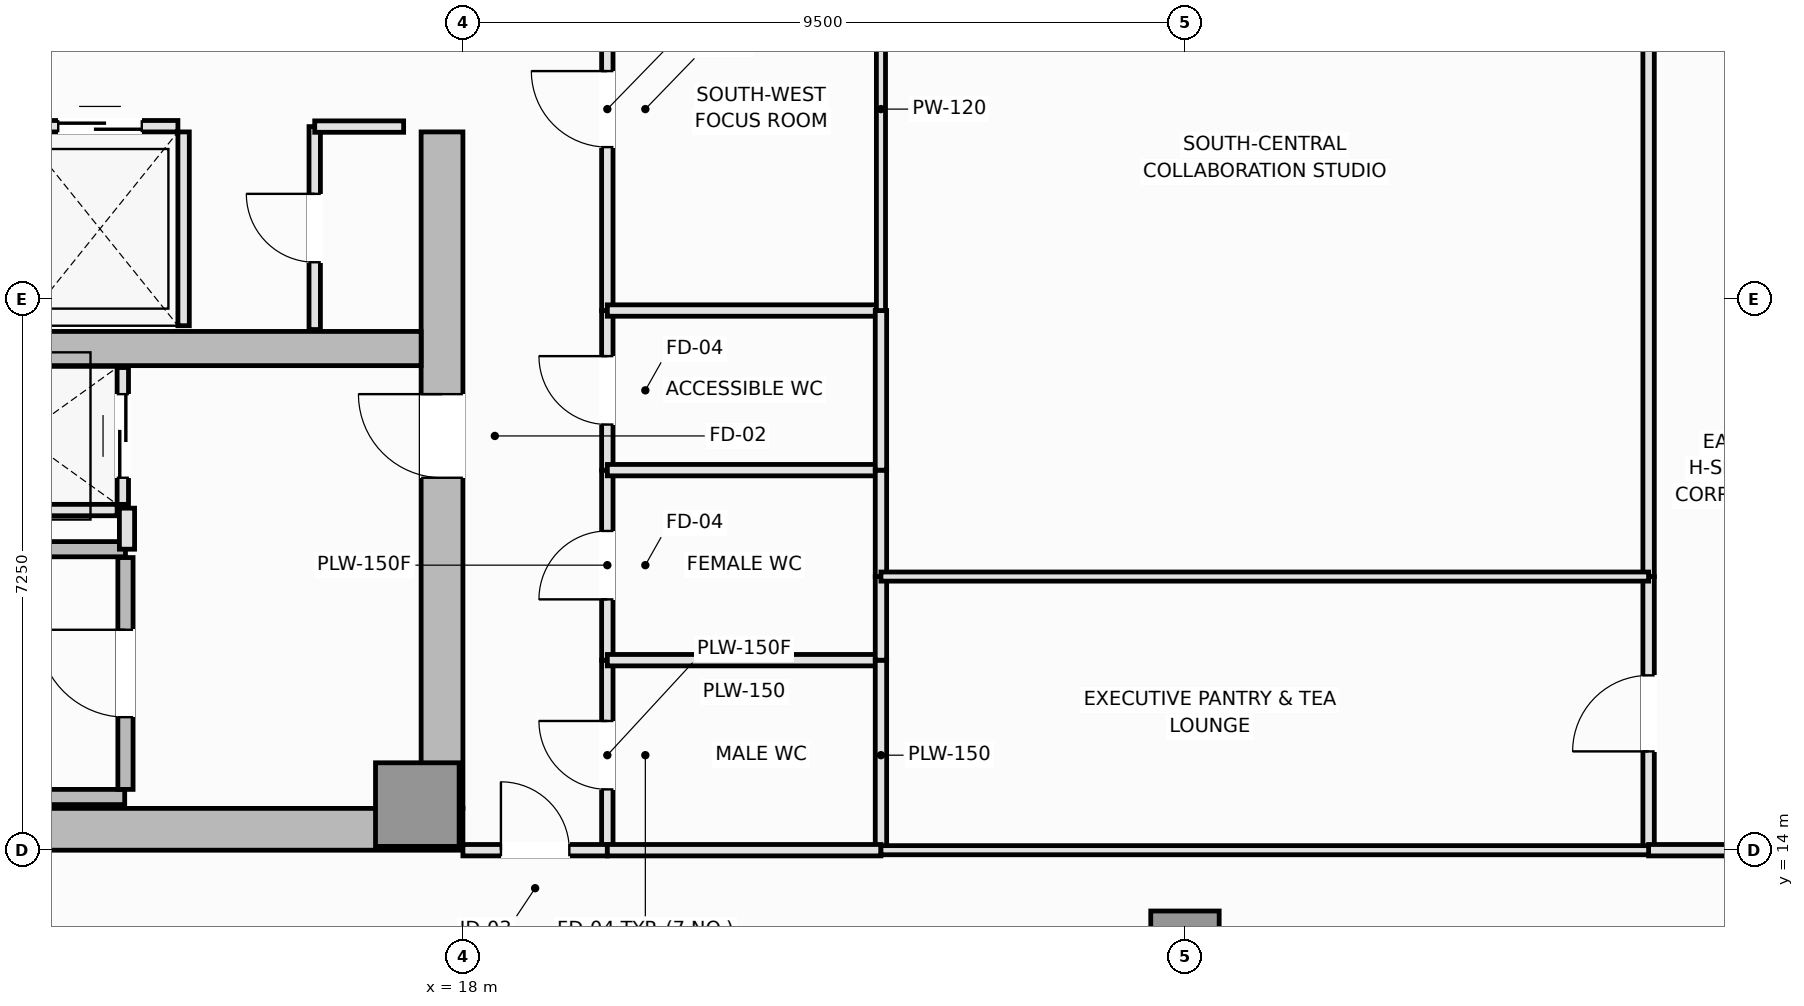
"""IFC4 building model, lengths in metres.
Left out: names, types, materials, properties, quantities, classifications, styles, units other than length and angle.
Written with IfcOpenShell. Run it as: python <this file> out.ifc"""

import sys

from ifc_helpers import new_model, si_unit, direction, frame, frame_2d, origin, origin_2d, place, context, subcontext, project, spatial, rectangle, extrude, element, fill, save


model = new_model("IFC4")
c1 = context("Model", 3, precision=1e-05, world=origin(), true_north=direction((0.0, 1.0)))
c2 = subcontext(c1, "Body", "Model", "MODEL_VIEW")
j1 = project(units=[si_unit("LENGTHUNIT", "METRE"), si_unit("PLANEANGLEUNIT", "RADIAN")], contexts=[c1])
p1 = place(None, origin())
s1 = spatial("IfcSite", under=j1, at=p1, CompositionType="ELEMENT")
p2 = place(p1, origin())
s2 = spatial("IfcBuilding", under=s1, at=p2, CompositionType="ELEMENT")
p3 = place(p2, frame((0.0, 0.0, 234.2)))
s3 = spatial("IfcBuildingStorey", under=s2, at=p3, CompositionType="ELEMENT", Elevation=234.2)
p4 = place(p3, frame((4.5, 14.275, 0.0), z_axis=(0.0, 0.0, 1.0), x_axis=(1.0, 0.0, 0.0)))
e1 = element("IfcWall", 1, at=p4, inside=s3, PredefinedType="SHEAR", context=c2, shape_type="SweptSolid", body=[
    extrude(rectangle(XDim=13.5, YDim=0.55, at=frame_2d((6.75, 0.0))), origin(), (0.0, 0.0, 1.0), 3.55),
])
p5 = place(p3, frame((17.725, 14.55, 0.0), z_axis=(0.0, 0.0, 1.0), x_axis=(0.0, 1.0, 0.0)))
e2 = element("IfcWall", 2, at=p5, inside=s3, PredefinedType="SHEAR", context=c2, shape_type="SweptSolid", body=[
    extrude(rectangle(XDim=8.9, YDim=0.55, at=frame_2d((4.45, 0.0))), origin(), (0.0, 0.0, 1.0), 3.55),
])
p6 = place(p5, frame((4.35, 0.0, 0.0)))
e3 = element("IfcOpeningElement", 3, at=p6, cuts=e2, PredefinedType="OPENING", context=c2, shape_type="SweptSolid", body=[
    extrude(rectangle(XDim=1.1, YDim=2.15, at=frame_2d((0.55, 1.075))), frame((0.0, 0.285, 0.0), z_axis=(0.0, -1.0, 0.0), x_axis=(1.0, 0.0, 0.0)), (0.0, 0.0, 1.0), 0.57),
])
p7 = place(p3, frame((5.05, 20.6, 0.0), z_axis=(0.0, 0.0, 1.0), x_axis=(1.0, 0.0, 0.0)))
e4 = element("IfcWall", 4, at=p7, inside=s3, PredefinedType="SHEAR", context=c2, shape_type="SweptSolid", body=[
    extrude(rectangle(XDim=12.4, YDim=0.45, at=frame_2d((6.2, 0.0))), origin(), (0.0, 0.0, 1.0), 3.55),
])
p8 = place(p3, frame((17.4, 14.6, 0.0), z_axis=(0.0, 0.0, 1.0), x_axis=(1.0, 0.0, 0.0)))
e5 = element("IfcColumn", 5, at=p8, inside=s3, PredefinedType="PILASTER", context=c2, shape_type="SweptSolid", body=[
    extrude(rectangle(XDim=1.1, YDim=1.1, at=origin_2d()), origin(), (0.0, 0.0, 1.0), 3.55),
])
p9 = place(p3, frame((27.5, 12.75, 0.0), z_axis=(0.0, 0.0, 1.0), x_axis=(1.0, 0.0, 0.0)))
e6 = element("IfcColumn", 6, at=p9, inside=s3, PredefinedType="COLUMN", context=c2, shape_type="SweptSolid", body=[
    extrude(rectangle(XDim=0.9, YDim=0.9, at=origin_2d()), origin(), (0.0, 0.0, 1.0), 3.55),
])
p10 = place(p3, frame((5.8, 14.7, 0.0), z_axis=(0.0, 0.0, 1.0), x_axis=(1.0, 0.0, 0.0)))
e7 = element("IfcWall", 7, at=p10, inside=s3, PredefinedType="SOLIDWALL", context=c2, shape_type="SweptSolid", body=[
    extrude(rectangle(XDim=7.75, YDim=0.2, at=frame_2d((3.875, 0.0))), origin(), (0.0, 0.0, 1.0), 3.55),
])
p11 = place(p3, frame((5.9, 17.96, 0.0), z_axis=(0.0, 0.0, 1.0), x_axis=(1.0, 0.0, 0.0)))
e8 = element("IfcWall", 8, at=p11, inside=s3, PredefinedType="SOLIDWALL", context=c2, shape_type="SweptSolid", body=[
    extrude(rectangle(XDim=7.66, YDim=0.2, at=frame_2d((3.83, 0.0))), origin(), (0.0, 0.0, 1.0), 3.55),
])
p12 = place(p3, frame((13.56, 14.8, 0.0), z_axis=(0.0, 0.0, 1.0), x_axis=(0.0, 1.0, 0.0)))
e9 = element("IfcWall", 9, at=p12, inside=s3, PredefinedType="SOLIDWALL", context=c2, shape_type="SweptSolid", body=[
    extrude(rectangle(XDim=3.05, YDim=0.2, at=frame_2d((1.525, 0.0))), origin(), (0.0, 0.0, 1.0), 3.55),
])
p13 = place(p12, frame((0.95, 0.0, 0.0)))
e10 = element("IfcOpeningElement", 10, at=p13, cuts=e9, PredefinedType="OPENING", context=c2, shape_type="SweptSolid", body=[
    extrude(rectangle(XDim=1.15, YDim=2.15, at=frame_2d((0.575, 1.075))), frame((0.0, 0.11, 0.0), z_axis=(0.0, -1.0, 0.0), x_axis=(1.0, 0.0, 0.0)), (0.0, 0.0, 1.0), 0.22),
])
p14 = place(p3, frame((12.2, 23.525, 0.0), z_axis=(0.0, 0.0, 1.0), x_axis=(1.0, 0.0, 0.0)))
e11 = element("IfcWall", 11, at=p14, inside=s3, PredefinedType="PARTITIONING", context=c2, shape_type="SweptSolid", body=[
    extrude(rectangle(XDim=2.05, YDim=0.15, at=frame_2d((1.025, 0.0))), origin(), (0.0, 0.0, 1.0), 3.37),
])
p15 = place(p14, frame((0.475, 0.0, 0.0)))
e12 = element("IfcOpeningElement", 12, at=p15, cuts=e11, PredefinedType="OPENING", context=c2, shape_type="SweptSolid", body=[
    extrude(rectangle(XDim=1.1, YDim=2.2, at=frame_2d((0.55, 1.1))), frame((0.0, 0.085, 0.0), z_axis=(0.0, -1.0, 0.0), x_axis=(1.0, 0.0, 0.0)), (0.0, 0.0, 1.0), 0.17),
])
p16 = place(p3, frame((14.325, 20.9, 0.0), z_axis=(0.0, 0.0, 1.0), x_axis=(0.0, 1.0, 0.0)))
e13 = element("IfcWall", 13, at=p16, inside=s3, PredefinedType="PARTITIONING", context=c2, shape_type="SweptSolid", body=[
    extrude(rectangle(XDim=2.55, YDim=0.15, at=frame_2d((1.275, 0.0))), origin(), (0.0, 0.0, 1.0), 3.37),
])
p17 = place(p3, frame((10.95, 18.475, 0.0), z_axis=(0.0, 0.0, 1.0), x_axis=(1.0, 0.0, 0.0)))
e14 = element("IfcWall", 14, at=p17, inside=s3, PredefinedType="PARTITIONING", context=c2, shape_type="SweptSolid", body=[
    extrude(rectangle(XDim=2.5, YDim=0.15, at=frame_2d((1.25, 0.0))), origin(), (0.0, 0.0, 1.0), 3.37),
])
p18 = place(p3, frame((13.525, 18.55, 0.0), z_axis=(0.0, 0.0, 1.0), x_axis=(0.0, 1.0, 0.0)))
e15 = element("IfcWall", 15, at=p18, inside=s3, PredefinedType="PARTITIONING", context=c2, shape_type="SweptSolid", body=[
    extrude(rectangle(XDim=1.8, YDim=0.15, at=frame_2d((0.9, 0.0))), origin(), (0.0, 0.0, 1.0), 3.37),
])
p19 = place(p18, frame((0.35, 0.0, 0.0)))
e16 = element("IfcOpeningElement", 16, at=p19, cuts=e15, PredefinedType="OPENING", context=c2, shape_type="SweptSolid", body=[
    extrude(rectangle(XDim=1.1, YDim=2.2, at=frame_2d((0.55, 1.1))), frame((0.0, 0.085, 0.0), z_axis=(0.0, -1.0, 0.0), x_axis=(1.0, 0.0, 0.0)), (0.0, 0.0, 1.0), 0.17),
])
p20 = place(p3, frame((13.58, 17.96, 0.0), z_axis=(0.0, 0.0, 1.0), x_axis=(0.0, 1.0, 0.0)))
e17 = element("IfcWall", 17, at=p20, inside=s3, PredefinedType="PARTITIONING", context=c2, shape_type="SweptSolid", body=[
    extrude(rectangle(XDim=0.54, YDim=0.2, at=frame_2d((0.27, 0.0))), origin(), (0.0, 0.0, 1.0), 3.37),
])
p21 = place(p3, frame((16.05, 20.85, 0.0), z_axis=(0.0, 0.0, 1.0), x_axis=(0.0, 1.0, 0.0)))
e18 = element("IfcWall", 18, at=p21, inside=s3, PredefinedType="PARTITIONING", context=c2, shape_type="SweptSolid", body=[
    extrude(rectangle(XDim=2.67, YDim=0.15, at=frame_2d((1.335, 0.0))), origin(), (0.0, 0.0, 1.0), 3.37),
])
p22 = place(p21, frame((0.885, 0.0, 0.0)))
e19 = element("IfcOpeningElement", 19, at=p22, cuts=e18, PredefinedType="OPENING", context=c2, shape_type="SweptSolid", body=[
    extrude(rectangle(XDim=0.9, YDim=2.1, at=frame_2d((0.45, 1.05))), frame((0.0, 0.085, 0.0), z_axis=(0.0, -1.0, 0.0), x_axis=(1.0, 0.0, 0.0)), (0.0, 0.0, 1.0), 0.17),
])
p23 = place(p3, frame((16.05, 23.52, 0.0), z_axis=(0.0, 0.0, 1.0), x_axis=(1.0, 0.0, 0.0)))
e20 = element("IfcWall", 20, at=p23, inside=s3, PredefinedType="PARTITIONING", context=c2, shape_type="SweptSolid", body=[
    extrude(rectangle(XDim=1.17, YDim=0.15, at=frame_2d((0.585, 0.0))), origin(), (0.0, 0.0, 1.0), 3.37),
])
p24 = place(p3, frame((19.9, 14.0, 0.0), z_axis=(0.0, 0.0, 1.0), x_axis=(0.0, 1.0, 0.0)))
e21 = element("IfcWall", 21, at=p24, inside=s3, PredefinedType="PLUMBINGWALL", context=c2, shape_type="SweptSolid", body=[
    extrude(rectangle(XDim=2.5, YDim=0.15, at=frame_2d((1.25, 0.0))), origin(), (0.0, 0.0, 1.0), 3.37),
])
p25 = place(p24, frame((0.8, 0.0, 0.0)))
e22 = element("IfcOpeningElement", 22, at=p25, cuts=e21, PredefinedType="OPENING", context=c2, shape_type="SweptSolid", body=[
    extrude(rectangle(XDim=0.9, YDim=2.1, at=frame_2d((0.45, 1.05))), frame((0.0, 0.085, 0.0), z_axis=(0.0, -1.0, 0.0), x_axis=(1.0, 0.0, 0.0)), (0.0, 0.0, 1.0), 0.17),
])
p26 = place(p3, frame((19.9, 16.5, 0.0), z_axis=(0.0, 0.0, 1.0), x_axis=(0.0, 1.0, 0.0)))
e23 = element("IfcWall", 23, at=p26, inside=s3, PredefinedType="PLUMBINGWALL", context=c2, shape_type="SweptSolid", body=[
    extrude(rectangle(XDim=2.5, YDim=0.15, at=frame_2d((1.25, 0.0))), origin(), (0.0, 0.0, 1.0), 3.37),
])
p27 = place(p26, frame((0.8, 0.0, 0.0)))
e24 = element("IfcOpeningElement", 24, at=p27, cuts=e23, PredefinedType="OPENING", context=c2, shape_type="SweptSolid", body=[
    extrude(rectangle(XDim=0.9, YDim=2.1, at=frame_2d((0.45, 1.05))), frame((0.0, 0.085, 0.0), z_axis=(0.0, -1.0, 0.0), x_axis=(1.0, 0.0, 0.0)), (0.0, 0.0, 1.0), 0.17),
])
p28 = place(p3, frame((19.9, 19.0, 0.0), z_axis=(0.0, 0.0, 1.0), x_axis=(0.0, 1.0, 0.0)))
e25 = element("IfcWall", 25, at=p28, inside=s3, PredefinedType="PLUMBINGWALL", context=c2, shape_type="SweptSolid", body=[
    extrude(rectangle(XDim=2.1, YDim=0.15, at=frame_2d((1.05, 0.0))), origin(), (0.0, 0.0, 1.0), 3.37),
])
p29 = place(p28, frame((0.6, 0.0, 0.0)))
e26 = element("IfcOpeningElement", 26, at=p29, cuts=e25, PredefinedType="OPENING", context=c2, shape_type="SweptSolid", body=[
    extrude(rectangle(XDim=0.9, YDim=2.1, at=frame_2d((0.45, 1.05))), frame((0.0, 0.085, 0.0), z_axis=(0.0, -1.0, 0.0), x_axis=(1.0, 0.0, 0.0)), (0.0, 0.0, 1.0), 0.17),
])
p30 = place(p3, frame((19.9, 21.1, 0.0), z_axis=(0.0, 0.0, 1.0), x_axis=(0.0, 1.0, 0.0)))
e27 = element("IfcWall", 27, at=p30, inside=s3, PredefinedType="PARTITIONING", context=c2, shape_type="SweptSolid", body=[
    extrude(rectangle(XDim=5.3, YDim=0.15, at=frame_2d((2.65, 0.0))), origin(), (0.0, 0.0, 1.0), 3.37),
])
p31 = place(p30, frame((2.15, 0.0, 0.0)))
e28 = element("IfcOpeningElement", 28, at=p31, cuts=e27, PredefinedType="OPENING", context=c2, shape_type="SweptSolid", body=[
    extrude(rectangle(XDim=1.0, YDim=2.15, at=frame_2d((0.5, 1.075))), frame((0.0, 0.085, 0.0), z_axis=(0.0, -1.0, 0.0), x_axis=(1.0, 0.0, 0.0)), (0.0, 0.0, 1.0), 0.17),
])
p32 = place(p3, frame((18.0, 14.0, 0.0), z_axis=(0.0, 0.0, 1.0), x_axis=(1.0, 0.0, 0.0)))
e29 = element("IfcWall", 29, at=p32, inside=s3, PredefinedType="PARTITIONING", context=c2, shape_type="SweptSolid", body=[
    extrude(rectangle(XDim=1.9, YDim=0.15, at=frame_2d((0.95, 0.0))), origin(), (0.0, 0.0, 1.0), 3.37),
])
p33 = place(p32, frame((0.5, 0.0, 0.0)))
e30 = element("IfcOpeningElement", 30, at=p33, cuts=e29, PredefinedType="OPENING", context=c2, shape_type="SweptSolid", body=[
    extrude(rectangle(XDim=0.9, YDim=2.1, at=frame_2d((0.45, 1.05))), frame((0.0, 0.085, 0.0), z_axis=(0.0, -1.0, 0.0), x_axis=(1.0, 0.0, 0.0)), (0.0, 0.0, 1.0), 0.17),
])
p34 = place(p3, frame((33.6, 14.0, 0.0), z_axis=(0.0, 0.0, 1.0), x_axis=(0.0, 1.0, 0.0)))
e31 = element("IfcWall", 31, at=p34, inside=s3, PredefinedType="PARTITIONING", context=c2, shape_type="SweptSolid", body=[
    extrude(rectangle(XDim=3.6, YDim=0.15, at=frame_2d((1.8, 0.0))), origin(), (0.0, 0.0, 1.0), 3.37),
])
p35 = place(p34, frame((1.3, 0.0, 0.0)))
e32 = element("IfcOpeningElement", 32, at=p35, cuts=e31, PredefinedType="OPENING", context=c2, shape_type="SweptSolid", body=[
    extrude(rectangle(XDim=1.0, YDim=2.15, at=frame_2d((0.5, 1.075))), frame((0.0, 0.085, 0.0), z_axis=(0.0, -1.0, 0.0), x_axis=(1.0, 0.0, 0.0)), (0.0, 0.0, 1.0), 0.17),
])
p36 = place(p3, frame((33.6, 17.6, 0.0), z_axis=(0.0, 0.0, 1.0), x_axis=(0.0, 1.0, 0.0)))
e33 = element("IfcWall", 33, at=p36, inside=s3, PredefinedType="PARTITIONING", context=c2, shape_type="SweptSolid", body=[
    extrude(rectangle(XDim=11.0, YDim=0.15, at=frame_2d((5.5, 0.0))), origin(), (0.0, 0.0, 1.0), 3.37),
])
p37 = place(p3, frame((33.6, 14.0, 0.0), z_axis=(0.0, 0.0, 1.0), x_axis=(1.0, 0.0, 0.0)))
e34 = element("IfcWall", 34, at=p37, inside=s3, PredefinedType="PARTITIONING", context=c2, shape_type="SweptSolid", body=[
    extrude(rectangle(XDim=1.9, YDim=0.15, at=frame_2d((0.95, 0.0))), origin(), (0.0, 0.0, 1.0), 3.37),
])
p38 = place(p3, frame((19.9, 16.5, 0.0), z_axis=(0.0, 0.0, 1.0), x_axis=(1.0, 0.0, 0.0)))
e35 = element("IfcWall", 35, at=p38, inside=s3, PredefinedType="PLUMBINGWALL", context=c2, shape_type="SweptSolid", body=[
    extrude(rectangle(XDim=3.6, YDim=0.15, at=frame_2d((1.8, 0.0))), origin(), (0.0, 0.0, 1.0), 3.37),
])
p39 = place(p3, frame((23.5, 14.0, 0.0), z_axis=(0.0, 0.0, 1.0), x_axis=(0.0, 1.0, 0.0)))
e36 = element("IfcWall", 36, at=p39, inside=s3, PredefinedType="PLUMBINGWALL", context=c2, shape_type="SweptSolid", body=[
    extrude(rectangle(XDim=2.5, YDim=0.15, at=frame_2d((1.25, 0.0))), origin(), (0.0, 0.0, 1.0), 3.37),
])
for number, where, z_axis, x_axis in (
    (37, (19.9, 14.0, 0.0), (0.0, 0.0, 1.0), (1.0, 0.0, 0.0)),
    (38, (19.9, 19.0, 0.0), (0.0, 0.0, 1.0), (1.0, 0.0, 0.0)),
):
    element("IfcWall", number, at=place(p3, frame(where, z_axis=z_axis, x_axis=x_axis)), inside=s3, PredefinedType="PLUMBINGWALL", context=c2, shape_type="SweptSolid", body=[
        extrude(rectangle(XDim=3.6, YDim=0.15, at=frame_2d((1.8, 0.0))), origin(), (0.0, 0.0, 1.0), 3.37),
    ])
p40 = place(p3, frame((23.5, 16.5, 0.0), z_axis=(0.0, 0.0, 1.0), x_axis=(0.0, 1.0, 0.0)))
e39 = element("IfcWall", 39, at=p40, inside=s3, PredefinedType="PLUMBINGWALL", context=c2, shape_type="SweptSolid", body=[
    extrude(rectangle(XDim=1.1, YDim=0.15, at=frame_2d((0.55, 0.0))), origin(), (0.0, 0.0, 1.0), 3.37),
])
p41 = place(p3, frame((23.5, 17.6, 0.0), z_axis=(0.0, 0.0, 1.0), x_axis=(0.0, 1.0, 0.0)))
e40 = element("IfcWall", 40, at=p41, inside=s3, PredefinedType="PLUMBINGWALL", context=c2, shape_type="SweptSolid", body=[
    extrude(rectangle(XDim=1.4, YDim=0.15, at=frame_2d((0.7, 0.0))), origin(), (0.0, 0.0, 1.0), 3.37),
])
p42 = place(p3, frame((19.9, 21.1, 0.0), z_axis=(0.0, 0.0, 1.0), x_axis=(1.0, 0.0, 0.0)))
e41 = element("IfcWall", 41, at=p42, inside=s3, PredefinedType="PLUMBINGWALL", context=c2, shape_type="SweptSolid", body=[
    extrude(rectangle(XDim=3.6, YDim=0.15, at=frame_2d((1.8, 0.0))), origin(), (0.0, 0.0, 1.0), 3.37),
])
p43 = place(p3, frame((23.5, 19.0, 0.0), z_axis=(0.0, 0.0, 1.0), x_axis=(0.0, 1.0, 0.0)))
e42 = element("IfcWall", 42, at=p43, inside=s3, PredefinedType="PLUMBINGWALL", context=c2, shape_type="SweptSolid", body=[
    extrude(rectangle(XDim=2.1, YDim=0.15, at=frame_2d((1.05, 0.0))), origin(), (0.0, 0.0, 1.0), 3.37),
])
p44 = place(p3, frame((23.5, 21.1, 0.0), z_axis=(0.0, 0.0, 1.0), x_axis=(0.0, 1.0, 0.0)))
e43 = element("IfcWall", 43, at=p44, inside=s3, PredefinedType="PARTITIONING", context=c2, shape_type="SweptSolid", body=[
    extrude(rectangle(XDim=5.3, YDim=0.12, at=frame_2d((2.65, 0.0))), origin(), (0.0, 0.0, 1.0), 3.37),
])
for number, where, z_axis, x_axis in (
    (44, (23.5, 17.6, 0.0), (0.0, 0.0, 1.0), (1.0, 0.0, 0.0)),
    (45, (23.5, 14.0, 0.0), (0.0, 0.0, 1.0), (1.0, 0.0, 0.0)),
):
    element("IfcWall", number, at=place(p3, frame(where, z_axis=z_axis, x_axis=x_axis)), inside=s3, PredefinedType="PARTITIONING", context=c2, shape_type="SweptSolid", body=[
        extrude(rectangle(XDim=10.1, YDim=0.12, at=frame_2d((5.05, 0.0))), origin(), (0.0, 0.0, 1.0), 3.37),
    ])
p45 = place(p13, origin())
e46 = element("IfcDoor", 46, at=p45, inside=s3, OperationType="SINGLE_SWING_RIGHT", PredefinedType="DOOR", context=c2, shape_type="SweptSolid", body=[
    extrude(rectangle(XDim=1.15, YDim=2.15, at=frame_2d((0.575, 1.075))), frame((0.0, 0.025, 0.0), z_axis=(0.0, -1.0, 0.0), x_axis=(1.0, 0.0, 0.0)), (0.0, 0.0, 1.0), 0.05),
])
fill(e10, e46)
p46 = place(p15, origin())
e47 = element("IfcDoor", 47, at=p46, inside=s3, OperationType="DOUBLE_DOOR_SLIDING", PredefinedType="DOOR", context=c2, shape_type="SweptSolid", body=[
    extrude(rectangle(XDim=1.1, YDim=2.2, at=frame_2d((0.55, 1.1))), frame((0.0, 0.025, 0.0), z_axis=(0.0, -1.0, 0.0), x_axis=(1.0, 0.0, 0.0)), (0.0, 0.0, 1.0), 0.05),
])
fill(e12, e47)
p47 = place(p19, origin())
e48 = element("IfcDoor", 48, at=p47, inside=s3, OperationType="DOUBLE_DOOR_SLIDING", PredefinedType="DOOR", context=c2, shape_type="SweptSolid", body=[
    extrude(rectangle(XDim=1.1, YDim=2.2, at=frame_2d((0.55, 1.1))), frame((0.0, 0.025, 0.0), z_axis=(0.0, -1.0, 0.0), x_axis=(1.0, 0.0, 0.0)), (0.0, 0.0, 1.0), 0.05),
])
fill(e16, e48)
p48 = place(p6, origin())
e49 = element("IfcDoor", 49, at=p48, inside=s3, OperationType="SINGLE_SWING_RIGHT", PredefinedType="DOOR", context=c2, shape_type="SweptSolid", body=[
    extrude(rectangle(XDim=1.1, YDim=2.15, at=frame_2d((0.55, 1.075))), frame((0.0, 0.025, 0.0), z_axis=(0.0, -1.0, 0.0), x_axis=(1.0, 0.0, 0.0)), (0.0, 0.0, 1.0), 0.05),
])
fill(e3, e49)
p49 = place(p22, origin())
e50 = element("IfcDoor", 50, at=p49, inside=s3, OperationType="SINGLE_SWING_RIGHT", PredefinedType="DOOR", context=c2, shape_type="SweptSolid", body=[
    extrude(rectangle(XDim=0.9, YDim=2.1, at=frame_2d((0.45, 1.05))), frame((0.0, 0.025, 0.0), z_axis=(0.0, -1.0, 0.0), x_axis=(1.0, 0.0, 0.0)), (0.0, 0.0, 1.0), 0.05),
])
fill(e19, e50)
p50 = place(p25, origin())
e51 = element("IfcDoor", 51, at=p50, inside=s3, OperationType="SINGLE_SWING_RIGHT", PredefinedType="DOOR", context=c2, shape_type="SweptSolid", body=[
    extrude(rectangle(XDim=0.9, YDim=2.1, at=frame_2d((0.45, 1.05))), frame((0.0, 0.025, 0.0), z_axis=(0.0, -1.0, 0.0), x_axis=(1.0, 0.0, 0.0)), (0.0, 0.0, 1.0), 0.05),
])
fill(e22, e51)
p51 = place(p27, origin())
e52 = element("IfcDoor", 52, at=p51, inside=s3, OperationType="SINGLE_SWING_LEFT", PredefinedType="DOOR", context=c2, shape_type="SweptSolid", body=[
    extrude(rectangle(XDim=0.9, YDim=2.1, at=frame_2d((0.45, 1.05))), frame((0.0, 0.025, 0.0), z_axis=(0.0, -1.0, 0.0), x_axis=(1.0, 0.0, 0.0)), (0.0, 0.0, 1.0), 0.05),
])
fill(e24, e52)
p52 = place(p29, origin())
e53 = element("IfcDoor", 53, at=p52, inside=s3, OperationType="SINGLE_SWING_RIGHT", PredefinedType="DOOR", context=c2, shape_type="SweptSolid", body=[
    extrude(rectangle(XDim=0.9, YDim=2.1, at=frame_2d((0.45, 1.05))), frame((0.0, 0.025, 0.0), z_axis=(0.0, -1.0, 0.0), x_axis=(1.0, 0.0, 0.0)), (0.0, 0.0, 1.0), 0.05),
])
fill(e26, e53)
p53 = place(p31, origin())
e54 = element("IfcDoor", 54, at=p53, inside=s3, OperationType="SINGLE_SWING_RIGHT", PredefinedType="DOOR", context=c2, shape_type="SweptSolid", body=[
    extrude(rectangle(XDim=1.0, YDim=2.15, at=frame_2d((0.5, 1.075))), frame((0.0, 0.025, 0.0), z_axis=(0.0, -1.0, 0.0), x_axis=(1.0, 0.0, 0.0)), (0.0, 0.0, 1.0), 0.05),
])
fill(e28, e54)
p54 = place(p33, origin())
e55 = element("IfcDoor", 55, at=p54, inside=s3, OperationType="SINGLE_SWING_LEFT", PredefinedType="DOOR", context=c2, shape_type="SweptSolid", body=[
    extrude(rectangle(XDim=0.9, YDim=2.1, at=frame_2d((0.45, 1.05))), frame((0.0, 0.025, 0.0), z_axis=(0.0, -1.0, 0.0), x_axis=(1.0, 0.0, 0.0)), (0.0, 0.0, 1.0), 0.05),
])
fill(e30, e55)
p55 = place(p35, origin())
e56 = element("IfcDoor", 56, at=p55, inside=s3, OperationType="SINGLE_SWING_LEFT", PredefinedType="DOOR", context=c2, shape_type="SweptSolid", body=[
    extrude(rectangle(XDim=1.0, YDim=2.15, at=frame_2d((0.5, 1.075))), frame((0.0, 0.025, 0.0), z_axis=(0.0, -1.0, 0.0), x_axis=(1.0, 0.0, 0.0)), (0.0, 0.0, 1.0), 0.05),
])
fill(e32, e56)
save(model, sys.argv[1])
